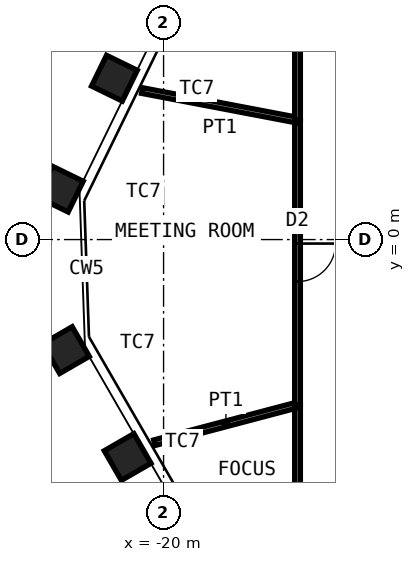
"""IFC4 building model, lengths in metres.
Left out: names, types, materials, properties, quantities, classifications, styles, units other than length and angle.
Written with IfcOpenShell. Run it as: python <this file> out.ifc"""

import sys

from ifc_helpers import new_model, si_unit, direction, frame, frame_2d, origin, origin_2d, place, context, subcontext, project, spatial, rectangle, hollow_rectangle, extrude, element, fill, save


model = new_model("IFC4")
c1 = context("Model", 3, precision=1e-05, world=origin(), true_north=direction((0.0, 1.0)))
c2 = subcontext(c1, "Body", "Model", "MODEL_VIEW")
j1 = project(units=[si_unit("LENGTHUNIT", "METRE"), si_unit("PLANEANGLEUNIT", "RADIAN")], contexts=[c1])
p1 = place(None, origin())
s1 = spatial("IfcSite", under=j1, at=p1, CompositionType="ELEMENT")
p2 = place(p1, origin())
s2 = spatial("IfcBuilding", under=s1, at=p2, CompositionType="ELEMENT")
p3 = place(p2, frame((0.0, 0.0, 266.2)))
s3 = spatial("IfcBuildingStorey", under=s2, at=p3, CompositionType="ELEMENT", Elevation=266.2)
for number, where, z_axis, x_axis in (
    (1, (-20.946, -5.721, 0.0), (0.0, 0.0, 1.0), (0.5, -0.866, 0.0)),
    (2, (-22.57, -2.908, 0.0), (0.0, 0.0, 1.0), (0.5, -0.866, 0.0)),
    (3, (-22.717, 1.327, 0.0), (0.0, 0.0, 1.0), (-0.438, -0.899, 0.0)),
    (4, (-21.293, 4.246, 0.0), (0.0, 0.0, 1.0), (-0.438, -0.899, 0.0)),
):
    element("IfcColumn", number, at=place(p3, frame(where, z_axis=z_axis, x_axis=x_axis)), inside=s3, PredefinedType="COLUMN", context=c2, shape_type="SweptSolid", body=[
        extrude(hollow_rectangle(XDim=0.9, YDim=0.9, WallThickness=0.06, at=origin_2d()), origin(), (0.0, 0.0, 1.0), 4.2),
    ])
p4 = place(p3, frame((-16.475, -10.601, 0.0), z_axis=(0.0, 0.0, 1.0), x_axis=(0.0, 1.0, 0.0)))
e5 = element("IfcWall", 5, at=p4, inside=s3, PredefinedType="PARTITIONING", context=c2, shape_type="SweptSolid", body=[
    extrude(rectangle(XDim=6.25, YDim=0.15, at=frame_2d((3.125, 0.0))), origin(), (0.0, 0.0, 1.0), 4.03),
])
p5 = place(p4, frame((2.625, 0.0, 0.0)))
e6 = element("IfcOpeningElement", 6, at=p5, cuts=e5, PredefinedType="OPENING", context=c2, shape_type="SweptSolid", body=[
    extrude(rectangle(XDim=1.0, YDim=2.4, at=frame_2d((0.5, 1.2))), frame((0.0, 0.085, 0.0), z_axis=(0.0, -1.0, 0.0), x_axis=(1.0, 0.0, 0.0)), (0.0, 0.0, 1.0), 0.17),
])
p6 = place(p3, frame((-20.243, -5.346, 0.0), z_axis=(0.0, 0.0, 1.0), x_axis=(0.966843659694, 0.25536902261, 0.0)))
e7 = element("IfcWall", 7, at=p6, inside=s3, PredefinedType="PARTITIONING", context=c2, shape_type="SweptSolid", body=[
    extrude(rectangle(XDim=3.897, YDim=0.15, at=frame_2d((1.948, 0.0))), origin(), (0.0, 0.0, 1.0), 3.33),
])
p7 = place(p3, frame((-16.475, -4.351, 0.0), z_axis=(0.0, 0.0, 1.0), x_axis=(0.0, 1.0, 0.0)))
e8 = element("IfcWall", 8, at=p7, inside=s3, PredefinedType="PARTITIONING", context=c2, shape_type="SweptSolid", body=[
    extrude(rectangle(XDim=7.492, YDim=0.15, at=frame_2d((3.746, 0.0))), origin(), (0.0, 0.0, 1.0), 4.03),
])
p8 = place(p7, frame((3.246, 0.0, 0.0)))
e9 = element("IfcOpeningElement", 9, at=p8, cuts=e8, PredefinedType="OPENING", context=c2, shape_type="SweptSolid", body=[
    extrude(rectangle(XDim=1.0, YDim=2.4, at=frame_2d((0.5, 1.2))), frame((0.0, 0.085, 0.0), z_axis=(0.0, -1.0, 0.0), x_axis=(1.0, 0.0, 0.0)), (0.0, 0.0, 1.0), 0.17),
])
p9 = place(p3, frame((-20.566, 3.921, 0.0), z_axis=(0.0, 0.0, 1.0), x_axis=(0.982304172816, -0.187292584123, 0.0)))
e10 = element("IfcWall", 10, at=p9, inside=s3, PredefinedType="PARTITIONING", context=c2, shape_type="SweptSolid", body=[
    extrude(rectangle(XDim=4.165, YDim=0.15, at=frame_2d((2.083, 0.0))), origin(), (0.0, 0.0, 1.0), 3.33),
])
p10 = place(p3, frame((-16.475, 3.141, 0.0), z_axis=(0.0, 0.0, 1.0), x_axis=(0.0, 1.0, 0.0)))
e11 = element("IfcWall", 11, at=p10, inside=s3, PredefinedType="PARTITIONING", context=c2, shape_type="SweptSolid", body=[
    extrude(rectangle(XDim=8.234, YDim=0.15, at=frame_2d((4.117, 0.0))), origin(), (0.0, 0.0, 1.0), 4.03),
])
p11 = place(p10, frame((3.217, 0.0, 0.0)))
e12 = element("IfcOpeningElement", 12, at=p11, cuts=e11, PredefinedType="OPENING", context=c2, shape_type="SweptSolid", body=[
    extrude(rectangle(XDim=1.8, YDim=2.4, at=frame_2d((0.9, 1.2))), frame((0.0, 0.085, 0.0), z_axis=(0.0, -1.0, 0.0), x_axis=(1.0, 0.0, 0.0)), (0.0, 0.0, 1.0), 0.17),
])
p12 = place(p8, origin())
e13 = element("IfcDoor", 13, at=p12, inside=s3, OperationType="SINGLE_SWING_RIGHT", PredefinedType="DOOR", context=c2, shape_type="SweptSolid", body=[
    extrude(rectangle(XDim=1.0, YDim=2.4, at=frame_2d((0.5, 1.2))), frame((0.0, 0.025, 0.0), z_axis=(0.0, -1.0, 0.0), x_axis=(1.0, 0.0, 0.0)), (0.0, 0.0, 1.0), 0.05),
])
fill(e9, e13)
save(model, sys.argv[1])
